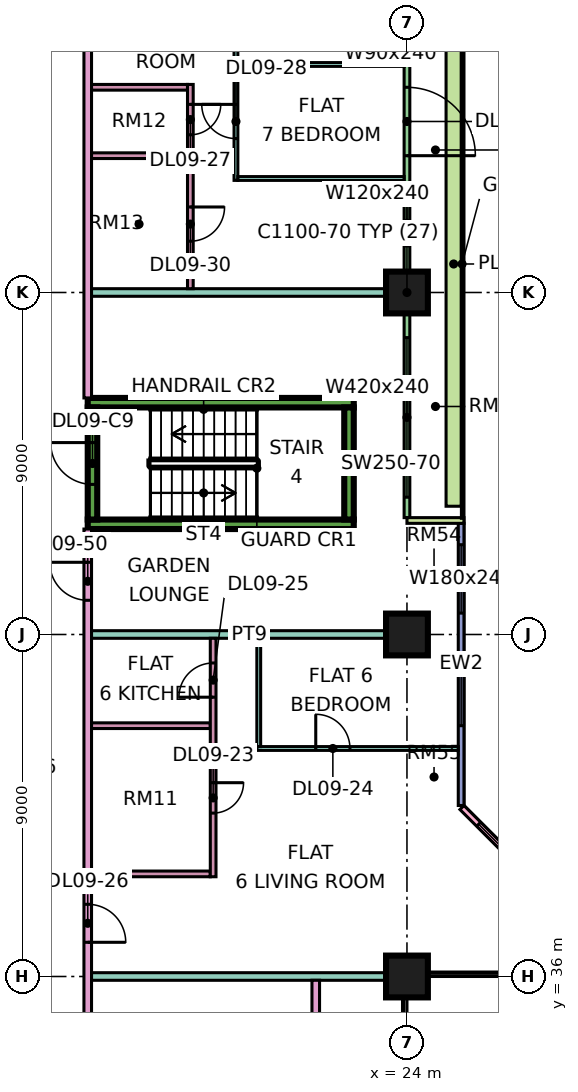
"""IFC4 building model, lengths in metres.
Left out: names, types, materials, properties, quantities, classifications, styles, units other than length and angle.
Written with IfcOpenShell. Run it as: python <this file> out.ifc"""

import sys

from ifc_helpers import new_model, si_unit, direction, frame, frame_2d, origin, origin_2d, place, context, subcontext, project, spatial, rectangle, extrude, element, fill, save


model = new_model("IFC4")
c1 = context("Model", 3, precision=1e-05, world=origin(), true_north=direction((0.0, 1.0)))
c2 = subcontext(c1, "Body", "Model", "MODEL_VIEW")
j1 = project(units=[si_unit("LENGTHUNIT", "METRE"), si_unit("PLANEANGLEUNIT", "RADIAN")], contexts=[c1])
p1 = place(None, origin())
s1 = spatial("IfcSite", under=j1, at=p1, CompositionType="ELEMENT")
p2 = place(p1, origin())
s2 = spatial("IfcBuilding", under=s1, at=p2, CompositionType="ELEMENT")
p3 = place(p2, frame((0.0, 0.0, 48.9)))
s3 = spatial("IfcBuildingStorey", under=s2, at=p3, CompositionType="ELEMENT", Elevation=48.9)
for number, where, z_axis, x_axis in (
    (1, (24.0, 36.0, 0.0), (0.0, 0.0, 1.0), (1.0, 0.0, 0.0)),
    (2, (24.0, 45.0, 0.0), (0.0, 0.0, 1.0), (1.0, 0.0, 0.0)),
    (3, (24.0, 54.0, 0.0), (0.0, 0.0, 1.0), (1.0, 0.0, 0.0)),
):
    element("IfcColumn", number, at=place(p3, frame(where, z_axis=z_axis, x_axis=x_axis)), inside=s3, PredefinedType="COLUMN", context=c2, shape_type="SweptSolid", body=[
        extrude(rectangle(XDim=1.1, YDim=1.1, at=origin_2d()), origin(), (0.0, 0.0, 1.0), 3.75),
    ])
for number, where, z_axis, x_axis in (
    (4, (15.6, 47.9, 0.0), (0.0, 0.0, 1.0), (1.0, 0.0, 0.0)),
    (5, (15.6, 51.1, 0.0), (0.0, 0.0, 1.0), (1.0, 0.0, 0.0)),
):
    element("IfcWall", number, at=place(p3, frame(where, z_axis=z_axis, x_axis=x_axis)), inside=s3, PredefinedType="SHEAR", context=c2, shape_type="SweptSolid", body=[
        extrude(rectangle(XDim=7.0, YDim=0.25, at=frame_2d((3.5, 0.0))), origin(), (0.0, 0.0, 1.0), 3.75),
    ])
p4 = place(p3, frame((15.725, 48.025, 0.0), z_axis=(0.0, 0.0, 1.0), x_axis=(0.0, 1.0, 0.0)))
e6 = element("IfcWall", 6, at=p4, inside=s3, PredefinedType="SHEAR", context=c2, shape_type="SweptSolid", body=[
    extrude(rectangle(XDim=2.95, YDim=0.25, at=frame_2d((1.475, 0.0))), origin(), (0.0, 0.0, 1.0), 3.75),
])
p5 = place(p4, frame((0.925, 0.0, 0.0)))
e7 = element("IfcOpeningElement", 7, at=p5, cuts=e6, PredefinedType="OPENING", context=c2, shape_type="SweptSolid", body=[
    extrude(rectangle(XDim=1.1, YDim=2.2, at=frame_2d((0.55, 1.1))), frame((0.0, 0.135, 0.0), z_axis=(0.0, -1.0, 0.0), x_axis=(1.0, 0.0, 0.0)), (0.0, 0.0, 1.0), 0.27),
])
p6 = place(p3, frame((22.475, 48.025, 0.0), z_axis=(0.0, 0.0, 1.0), x_axis=(0.0, 1.0, 0.0)))
e8 = element("IfcWall", 8, at=p6, inside=s3, PredefinedType="SHEAR", context=c2, shape_type="SweptSolid", body=[
    extrude(rectangle(XDim=2.95, YDim=0.25, at=frame_2d((1.475, 0.0))), origin(), (0.0, 0.0, 1.0), 3.75),
])
p7 = place(p3, frame((28.447, 37.447, 0.0), z_axis=(0.0, 0.0, 1.0), x_axis=(-0.707106781187, 0.707106781187, 0.0)))
e9 = element("IfcWall", 9, at=p7, inside=s3, PredefinedType="SOLIDWALL", context=c2, shape_type="SweptSolid", body=[
    extrude(rectangle(XDim=4.243, YDim=0.15, at=frame_2d((2.121, 0.0))), origin(), (0.0, 0.0, 1.0), 3.35),
])
p8 = place(p7, frame((0.621, 0.0, 0.45)))
e10 = element("IfcOpeningElement", 10, at=p8, cuts=e9, PredefinedType="OPENING", context=c2, shape_type="SweptSolid", body=[
    extrude(rectangle(XDim=3.0, YDim=2.4, at=frame_2d((1.5, 1.2))), frame((0.0, 0.085, 0.0), z_axis=(0.0, -1.0, 0.0), x_axis=(1.0, 0.0, 0.0)), (0.0, 0.0, 1.0), 0.17),
])
p9 = place(p3, frame((25.425, 40.5, 0.0), z_axis=(0.0, 0.0, 1.0), x_axis=(0.0, 1.0, 0.0)))
e11 = element("IfcWall", 11, at=p9, inside=s3, PredefinedType="SOLIDWALL", context=c2, shape_type="SweptSolid", body=[
    extrude(rectangle(XDim=7.425, YDim=0.15, at=frame_2d((3.712, 0.0))), origin(), (0.0, 0.0, 1.0), 3.35),
])
p10 = place(p9, frame((2.1, 0.0, 0.45)))
e12 = element("IfcOpeningElement", 12, at=p10, cuts=e11, PredefinedType="OPENING", context=c2, shape_type="SweptSolid", body=[
    extrude(rectangle(XDim=1.8, YDim=2.4, at=frame_2d((0.9, 1.2))), frame((0.0, 0.085, 0.0), z_axis=(0.0, -1.0, 0.0), x_axis=(1.0, 0.0, 0.0)), (0.0, 0.0, 1.0), 0.17),
])
p11 = place(p9, frame((5.062, 0.0, 0.45)))
e13 = element("IfcOpeningElement", 13, at=p11, cuts=e11, PredefinedType="OPENING", context=c2, shape_type="SweptSolid", body=[
    extrude(rectangle(XDim=1.8, YDim=2.4, at=frame_2d((0.9, 1.2))), frame((0.0, 0.085, 0.0), z_axis=(0.0, -1.0, 0.0), x_axis=(1.0, 0.0, 0.0)), (0.0, 0.0, 1.0), 0.17),
])
p12 = place(p3, frame((24.0, 48.075, 0.0), z_axis=(0.0, 0.0, 1.0), x_axis=(0.0, 1.0, 0.0)))
e14 = element("IfcWall", 14, at=p12, inside=s3, PredefinedType="SOLIDWALL", context=c2, shape_type="SweptSolid", body=[
    extrude(rectangle(XDim=13.35, YDim=0.15, at=frame_2d((6.675, 0.0))), origin(), (0.0, 0.0, 1.0), 3.35),
])
p13 = place(p12, frame((0.538, 0.0, 0.45)))
e15 = element("IfcOpeningElement", 15, at=p13, cuts=e14, PredefinedType="OPENING", context=c2, shape_type="SweptSolid", body=[
    extrude(rectangle(XDim=4.2, YDim=2.4, at=frame_2d((2.1, 1.2))), frame((0.0, 0.085, 0.0), z_axis=(0.0, -1.0, 0.0), x_axis=(1.0, 0.0, 0.0)), (0.0, 0.0, 1.0), 0.17),
])
p14 = place(p12, frame((7.15, 0.0, 0.45)))
e16 = element("IfcOpeningElement", 16, at=p14, cuts=e14, PredefinedType="OPENING", context=c2, shape_type="SweptSolid", body=[
    extrude(rectangle(XDim=1.2, YDim=2.4, at=frame_2d((0.6, 1.2))), frame((0.0, 0.085, 0.0), z_axis=(0.0, -1.0, 0.0), x_axis=(1.0, 0.0, 0.0)), (0.0, 0.0, 1.0), 0.17),
])
p15 = place(p12, frame((9.525, 0.0, 0.0)))
e17 = element("IfcOpeningElement", 17, at=p15, cuts=e14, PredefinedType="OPENING", context=c2, shape_type="SweptSolid", body=[
    extrude(rectangle(XDim=1.8, YDim=2.4, at=frame_2d((0.9, 1.2))), frame((0.0, 0.085, 0.0), z_axis=(0.0, -1.0, 0.0), x_axis=(1.0, 0.0, 0.0)), (0.0, 0.0, 1.0), 0.17),
])
p16 = place(p12, frame((12.188, 0.0, 0.45)))
e18 = element("IfcOpeningElement", 18, at=p16, cuts=e14, PredefinedType="OPENING", context=c2, shape_type="SweptSolid", body=[
    extrude(rectangle(XDim=0.9, YDim=2.4, at=frame_2d((0.45, 1.2))), frame((0.0, 0.085, 0.0), z_axis=(0.0, -1.0, 0.0), x_axis=(1.0, 0.0, 0.0)), (0.0, 0.0, 1.0), 0.17),
])
p17 = place(p3, frame((25.5, 48.0, 0.0), z_axis=(0.0, 0.0, 1.0), x_axis=(-1.0, 0.0, 0.0)))
e19 = element("IfcWall", 19, at=p17, inside=s3, PredefinedType="SOLIDWALL", context=c2, shape_type="SweptSolid", body=[
    extrude(rectangle(XDim=1.5, YDim=0.15, at=frame_2d((0.75, 0.0))), origin(), (0.0, 0.0, 1.0), 3.35),
])
p18 = place(p3, frame((25.229, 48.375, 0.0), z_axis=(0.0, 0.0, 1.0), x_axis=(0.0, 1.0, 0.0)))
e20 = element("IfcWall", 20, at=p18, inside=s3, PredefinedType="SOLIDWALL", context=c2, shape_type="SweptSolid", body=[
    extrude(rectangle(XDim=12.75, YDim=0.4, at=frame_2d((6.375, 0.0))), origin(), (0.0, 0.0, 1.0), 0.7),
])
p19 = place(p3, frame((15.6, 20.0, 0.0), z_axis=(0.0, 0.0, 1.0), x_axis=(0.0, 1.0, 0.0)))
e21 = element("IfcWall", 21, at=p19, inside=s3, PredefinedType="PARTITIONING", context=c2, shape_type="SweptSolid", body=[
    extrude(rectangle(XDim=27.775, YDim=0.2, at=frame_2d((13.887, 0.0))), origin(), (0.0, 0.0, 1.0), 3.35),
])
p20 = place(p19, frame((6.7, 0.0, 0.0)))
e22 = element("IfcOpeningElement", 22, at=p20, cuts=e21, PredefinedType="OPENING", context=c2, shape_type="SweptSolid", body=[
    extrude(rectangle(XDim=1.6, YDim=2.1, at=frame_2d((0.8, 1.05))), frame((0.0, 0.11, 0.0), z_axis=(0.0, -1.0, 0.0), x_axis=(1.0, 0.0, 0.0)), (0.0, 0.0, 1.0), 0.22),
])
p21 = place(p19, frame((12.95, 0.0, 0.0)))
e23 = element("IfcOpeningElement", 23, at=p21, cuts=e21, PredefinedType="OPENING", context=c2, shape_type="SweptSolid", body=[
    extrude(rectangle(XDim=1.0, YDim=2.1, at=frame_2d((0.5, 1.05))), frame((0.0, 0.11, 0.0), z_axis=(0.0, -1.0, 0.0), x_axis=(1.0, 0.0, 0.0)), (0.0, 0.0, 1.0), 0.22),
])
p22 = place(p19, frame((16.9, 0.0, 0.0)))
e24 = element("IfcOpeningElement", 24, at=p22, cuts=e21, PredefinedType="OPENING", context=c2, shape_type="SweptSolid", body=[
    extrude(rectangle(XDim=1.0, YDim=2.1, at=frame_2d((0.5, 1.05))), frame((0.0, 0.11, 0.0), z_axis=(0.0, -1.0, 0.0), x_axis=(1.0, 0.0, 0.0)), (0.0, 0.0, 1.0), 0.22),
])
p23 = place(p19, frame((1.15, 0.0, 0.0)))
e25 = element("IfcOpeningElement", 25, at=p23, cuts=e21, PredefinedType="OPENING", context=c2, shape_type="SweptSolid", body=[
    extrude(rectangle(XDim=1.8, YDim=2.1, at=frame_2d((0.9, 1.05))), frame((0.0, 0.11, 0.0), z_axis=(0.0, -1.0, 0.0), x_axis=(1.0, 0.0, 0.0)), (0.0, 0.0, 1.0), 0.22),
])
p24 = place(p19, frame((25.9, 0.0, 0.0)))
e26 = element("IfcOpeningElement", 26, at=p24, cuts=e21, PredefinedType="OPENING", context=c2, shape_type="SweptSolid", body=[
    extrude(rectangle(XDim=1.0, YDim=2.1, at=frame_2d((0.5, 1.05))), frame((0.0, 0.11, 0.0), z_axis=(0.0, -1.0, 0.0), x_axis=(1.0, 0.0, 0.0)), (0.0, 0.0, 1.0), 0.22),
])
p25 = place(p3, frame((15.6, 51.225, 0.0), z_axis=(0.0, 0.0, 1.0), x_axis=(0.0, 1.0, 0.0)))
e27 = element("IfcWall", 27, at=p25, inside=s3, PredefinedType="PARTITIONING", context=c2, shape_type="SweptSolid", body=[
    extrude(rectangle(XDim=13.125, YDim=0.2, at=frame_2d((6.562, 0.0))), origin(), (0.0, 0.0, 1.0), 3.35),
])
p26 = place(p25, frame((9.525, 0.0, 0.0)))
e28 = element("IfcOpeningElement", 28, at=p26, cuts=e27, PredefinedType="OPENING", context=c2, shape_type="SweptSolid", body=[
    extrude(rectangle(XDim=1.0, YDim=2.1, at=frame_2d((0.5, 1.05))), frame((0.0, 0.11, 0.0), z_axis=(0.0, -1.0, 0.0), x_axis=(1.0, 0.0, 0.0)), (0.0, 0.0, 1.0), 0.22),
])
p27 = place(p3, frame((15.7, 36.0, 0.0), z_axis=(0.0, 0.0, 1.0), x_axis=(1.0, 0.0, 0.0)))
e29 = element("IfcWall", 29, at=p27, inside=s3, PredefinedType="PARTITIONING", context=c2, shape_type="SweptSolid", body=[
    extrude(rectangle(XDim=8.3, YDim=0.2, at=frame_2d((4.15, 0.0))), origin(), (0.0, 0.0, 1.0), 3.35),
])
for number, where, z_axis, x_axis in (
    (30, (15.7, 38.7, 0.0), (0.0, 0.0, 1.0), (1.0, 0.0, 0.0)),
    (31, (15.7, 42.6, 0.0), (0.0, 0.0, 1.0), (1.0, 0.0, 0.0)),
):
    element("IfcWall", number, at=place(p3, frame(where, z_axis=z_axis, x_axis=x_axis)), inside=s3, PredefinedType="PARTITIONING", context=c2, shape_type="SweptSolid", body=[
        extrude(rectangle(XDim=3.125, YDim=0.15, at=frame_2d((1.562, 0.0))), origin(), (0.0, 0.0, 1.0), 3.35),
    ])
p28 = place(p3, frame((15.7, 45.0, 0.0), z_axis=(0.0, 0.0, 1.0), x_axis=(1.0, 0.0, 0.0)))
e32 = element("IfcWall", 32, at=p28, inside=s3, PredefinedType="PARTITIONING", context=c2, shape_type="SweptSolid", body=[
    extrude(rectangle(XDim=8.3, YDim=0.2, at=frame_2d((4.15, 0.0))), origin(), (0.0, 0.0, 1.0), 3.35),
])
p29 = place(p3, frame((15.7, 54.0, 0.0), z_axis=(0.0, 0.0, 1.0), x_axis=(1.0, 0.0, 0.0)))
e33 = element("IfcWall", 33, at=p29, inside=s3, PredefinedType="PARTITIONING", context=c2, shape_type="SweptSolid", body=[
    extrude(rectangle(XDim=8.226, YDim=0.2, at=frame_2d((4.113, 0.0))), origin(), (0.0, 0.0, 1.0), 3.35),
])
for number, where, z_axis, x_axis in (
    (34, (15.7, 57.6, 0.0), (0.0, 0.0, 1.0), (1.0, 0.0, 0.0)),
    (35, (15.7, 59.4, 0.0), (0.0, 0.0, 1.0), (1.0, 0.0, 0.0)),
):
    element("IfcWall", number, at=place(p3, frame(where, z_axis=z_axis, x_axis=x_axis)), inside=s3, PredefinedType="PARTITIONING", context=c2, shape_type="SweptSolid", body=[
        extrude(rectangle(XDim=2.525, YDim=0.15, at=frame_2d((1.263, 0.0))), origin(), (0.0, 0.0, 1.0), 3.35),
    ])
p30 = place(p3, frame((18.3, 54.1, 0.0), z_axis=(0.0, 0.0, 1.0), x_axis=(0.0, 1.0, 0.0)))
e36 = element("IfcWall", 36, at=p30, inside=s3, PredefinedType="PARTITIONING", context=c2, shape_type="SweptSolid", body=[
    extrude(rectangle(XDim=5.375, YDim=0.15, at=frame_2d((2.688, 0.0))), origin(), (0.0, 0.0, 1.0), 3.35),
])
p31 = place(p30, frame((4.05, 0.0, 0.0)))
e37 = element("IfcOpeningElement", 37, at=p31, cuts=e36, PredefinedType="OPENING", context=c2, shape_type="SweptSolid", body=[
    extrude(rectangle(XDim=0.8, YDim=2.1, at=frame_2d((0.4, 1.05))), frame((0.0, 0.085, 0.0), z_axis=(0.0, -1.0, 0.0), x_axis=(1.0, 0.0, 0.0)), (0.0, 0.0, 1.0), 0.17),
])
p32 = place(p30, frame((1.25, 0.0, 0.0)))
e38 = element("IfcOpeningElement", 38, at=p32, cuts=e36, PredefinedType="OPENING", context=c2, shape_type="SweptSolid", body=[
    extrude(rectangle(XDim=0.9, YDim=2.1, at=frame_2d((0.45, 1.05))), frame((0.0, 0.085, 0.0), z_axis=(0.0, -1.0, 0.0), x_axis=(1.0, 0.0, 0.0)), (0.0, 0.0, 1.0), 0.17),
])
p33 = place(p3, frame((18.9, 38.625, 0.0), z_axis=(0.0, 0.0, 1.0), x_axis=(0.0, 1.0, 0.0)))
e39 = element("IfcWall", 39, at=p33, inside=s3, PredefinedType="PARTITIONING", context=c2, shape_type="SweptSolid", body=[
    extrude(rectangle(XDim=6.275, YDim=0.15, at=frame_2d((3.137, 0.0))), origin(), (0.0, 0.0, 1.0), 3.35),
])
p34 = place(p33, frame((1.675, 0.0, 0.0)))
e40 = element("IfcOpeningElement", 40, at=p34, cuts=e39, PredefinedType="OPENING", context=c2, shape_type="SweptSolid", body=[
    extrude(rectangle(XDim=0.8, YDim=2.1, at=frame_2d((0.4, 1.05))), frame((0.0, 0.085, 0.0), z_axis=(0.0, -1.0, 0.0), x_axis=(1.0, 0.0, 0.0)), (0.0, 0.0, 1.0), 0.17),
])
p35 = place(p33, frame((4.725, 0.0, 0.0)))
e41 = element("IfcOpeningElement", 41, at=p35, cuts=e39, PredefinedType="OPENING", context=c2, shape_type="SweptSolid", body=[
    extrude(rectangle(XDim=0.9, YDim=2.1, at=frame_2d((0.45, 1.05))), frame((0.0, 0.085, 0.0), z_axis=(0.0, -1.0, 0.0), x_axis=(1.0, 0.0, 0.0)), (0.0, 0.0, 1.0), 0.17),
])
p36 = place(p3, frame((19.5, 56.95, 0.0), z_axis=(0.0, 0.0, 1.0), x_axis=(0.0, 1.0, 0.0)))
e42 = element("IfcWall", 42, at=p36, inside=s3, PredefinedType="PARTITIONING", context=c2, shape_type="SweptSolid", body=[
    extrude(rectangle(XDim=7.4, YDim=0.1, at=frame_2d((3.7, 0.0))), origin(), (0.0, 0.0, 1.0), 3.35),
])
p37 = place(p36, frame((1.1, 0.0, 0.0)))
e43 = element("IfcOpeningElement", 43, at=p37, cuts=e42, PredefinedType="OPENING", context=c2, shape_type="SweptSolid", body=[
    extrude(rectangle(XDim=0.9, YDim=2.1, at=frame_2d((0.45, 1.05))), frame((0.0, 0.06, 0.0), z_axis=(0.0, -1.0, 0.0), x_axis=(1.0, 0.0, 0.0)), (0.0, 0.0, 1.0), 0.12),
])
p38 = place(p36, frame((4.1, 0.0, 0.0)))
e44 = element("IfcOpeningElement", 44, at=p38, cuts=e42, PredefinedType="OPENING", context=c2, shape_type="SweptSolid", body=[
    extrude(rectangle(XDim=0.9, YDim=2.1, at=frame_2d((0.45, 1.05))), frame((0.0, 0.06, 0.0), z_axis=(0.0, -1.0, 0.0), x_axis=(1.0, 0.0, 0.0)), (0.0, 0.0, 1.0), 0.12),
])
for number, where, z_axis, x_axis in (
    (45, (19.55, 57.0, 0.0), (0.0, 0.0, 1.0), (1.0, 0.0, 0.0)),
    (46, (19.55, 60.0, 0.0), (0.0, 0.0, 1.0), (1.0, 0.0, 0.0)),
):
    element("IfcWall", number, at=place(p3, frame(where, z_axis=z_axis, x_axis=x_axis)), inside=s3, PredefinedType="PARTITIONING", context=c2, shape_type="SweptSolid", body=[
        extrude(rectangle(XDim=4.376, YDim=0.1, at=frame_2d((2.188, 0.0))), origin(), (0.0, 0.0, 1.0), 3.35),
    ])
p39 = place(p3, frame((20.05, 42.0, 0.0), z_axis=(0.0, 0.0, 1.0), x_axis=(1.0, 0.0, 0.0)))
e47 = element("IfcWall", 47, at=p39, inside=s3, PredefinedType="PARTITIONING", context=c2, shape_type="SweptSolid", body=[
    extrude(rectangle(XDim=5.3, YDim=0.1, at=frame_2d((2.65, 0.0))), origin(), (0.0, 0.0, 1.0), 3.35),
])
p40 = place(p39, frame((1.55, 0.0, 0.0)))
e48 = element("IfcOpeningElement", 48, at=p40, cuts=e47, PredefinedType="OPENING", context=c2, shape_type="SweptSolid", body=[
    extrude(rectangle(XDim=0.9, YDim=2.1, at=frame_2d((0.45, 1.05))), frame((0.0, 0.06, 0.0), z_axis=(0.0, -1.0, 0.0), x_axis=(1.0, 0.0, 0.0)), (0.0, 0.0, 1.0), 0.12),
])
p41 = place(p3, frame((20.1, 42.05, 0.0), z_axis=(0.0, 0.0, 1.0), x_axis=(0.0, 1.0, 0.0)))
e49 = element("IfcWall", 49, at=p41, inside=s3, PredefinedType="PARTITIONING", context=c2, shape_type="SweptSolid", body=[
    extrude(rectangle(XDim=2.85, YDim=0.1, at=frame_2d((1.425, 0.0))), origin(), (0.0, 0.0, 1.0), 3.35),
])
p42 = place(p3, frame((21.6, 23.9, 0.0), z_axis=(0.0, 0.0, 1.0), x_axis=(0.0, 1.0, 0.0)))
e50 = element("IfcWall", 50, at=p42, inside=s3, PredefinedType="PARTITIONING", context=c2, shape_type="SweptSolid", body=[
    extrude(rectangle(XDim=12.0, YDim=0.2, at=frame_2d((6.0, 0.0))), origin(), (0.0, 0.0, 1.0), 3.35),
])
p43 = place(p8, origin())
e51 = element("IfcWindow", 51, at=p43, inside=s3, PartitioningType="SINGLE_PANEL", PredefinedType="WINDOW", context=c2, shape_type="SweptSolid", body=[
    extrude(rectangle(XDim=3.0, YDim=2.4, at=frame_2d((1.5, 1.2))), frame((0.0, 0.03, 0.0), z_axis=(0.0, -1.0, 0.0), x_axis=(1.0, 0.0, 0.0)), (0.0, 0.0, 1.0), 0.06),
])
fill(e10, e51)
p44 = place(p10, origin())
e52 = element("IfcWindow", 52, at=p44, inside=s3, PartitioningType="SINGLE_PANEL", PredefinedType="WINDOW", context=c2, shape_type="SweptSolid", body=[
    extrude(rectangle(XDim=1.8, YDim=2.4, at=frame_2d((0.9, 1.2))), frame((0.0, 0.03, 0.0), z_axis=(0.0, -1.0, 0.0), x_axis=(1.0, 0.0, 0.0)), (0.0, 0.0, 1.0), 0.06),
])
fill(e12, e52)
p45 = place(p11, origin())
e53 = element("IfcWindow", 53, at=p45, inside=s3, PartitioningType="SINGLE_PANEL", PredefinedType="WINDOW", context=c2, shape_type="SweptSolid", body=[
    extrude(rectangle(XDim=1.8, YDim=2.4, at=frame_2d((0.9, 1.2))), frame((0.0, 0.03, 0.0), z_axis=(0.0, -1.0, 0.0), x_axis=(1.0, 0.0, 0.0)), (0.0, 0.0, 1.0), 0.06),
])
fill(e13, e53)
p46 = place(p13, origin())
e54 = element("IfcWindow", 54, at=p46, inside=s3, PartitioningType="SINGLE_PANEL", PredefinedType="WINDOW", context=c2, shape_type="SweptSolid", body=[
    extrude(rectangle(XDim=4.2, YDim=2.4, at=frame_2d((2.1, 1.2))), frame((0.0, 0.03, 0.0), z_axis=(0.0, -1.0, 0.0), x_axis=(1.0, 0.0, 0.0)), (0.0, 0.0, 1.0), 0.06),
])
fill(e15, e54)
p47 = place(p14, origin())
e55 = element("IfcWindow", 55, at=p47, inside=s3, PartitioningType="SINGLE_PANEL", PredefinedType="WINDOW", context=c2, shape_type="SweptSolid", body=[
    extrude(rectangle(XDim=1.2, YDim=2.4, at=frame_2d((0.6, 1.2))), frame((0.0, 0.03, 0.0), z_axis=(0.0, -1.0, 0.0), x_axis=(1.0, 0.0, 0.0)), (0.0, 0.0, 1.0), 0.06),
])
fill(e16, e55)
p48 = place(p15, frame((1.8, 0.0, 0.0), z_axis=(0.0, 0.0, 1.0), x_axis=(-1.0, 0.0, 0.0)))
e56 = element("IfcDoor", 56, at=p48, inside=s3, OperationType="DOUBLE_DOOR_SINGLE_SWING", PredefinedType="DOOR", context=c2, shape_type="SweptSolid", body=[
    extrude(rectangle(XDim=1.8, YDim=2.4, at=frame_2d((0.9, 1.2))), frame((0.0, 0.025, 0.0), z_axis=(0.0, -1.0, 0.0), x_axis=(1.0, 0.0, 0.0)), (0.0, 0.0, 1.0), 0.05),
])
fill(e17, e56)
p49 = place(p16, origin())
e57 = element("IfcWindow", 57, at=p49, inside=s3, PartitioningType="SINGLE_PANEL", PredefinedType="WINDOW", context=c2, shape_type="SweptSolid", body=[
    extrude(rectangle(XDim=0.9, YDim=2.4, at=frame_2d((0.45, 1.2))), frame((0.0, 0.03, 0.0), z_axis=(0.0, -1.0, 0.0), x_axis=(1.0, 0.0, 0.0)), (0.0, 0.0, 1.0), 0.06),
])
fill(e18, e57)
p50 = place(p5, frame((1.1, 0.0, 0.0), z_axis=(0.0, 0.0, 1.0), x_axis=(-1.0, 0.0, 0.0)))
e58 = element("IfcDoor", 58, at=p50, inside=s3, OperationType="SINGLE_SWING_RIGHT", PredefinedType="DOOR", context=c2, shape_type="SweptSolid", body=[
    extrude(rectangle(XDim=1.1, YDim=2.2, at=frame_2d((0.55, 1.1))), frame((0.0, 0.025, 0.0), z_axis=(0.0, -1.0, 0.0), x_axis=(1.0, 0.0, 0.0)), (0.0, 0.0, 1.0), 0.05),
])
fill(e7, e58)
p51 = place(p34, origin())
e59 = element("IfcDoor", 59, at=p51, inside=s3, OperationType="SINGLE_SWING_RIGHT", PredefinedType="DOOR", context=c2, shape_type="SweptSolid", body=[
    extrude(rectangle(XDim=0.8, YDim=2.1, at=frame_2d((0.4, 1.05))), frame((0.0, 0.025, 0.0), z_axis=(0.0, -1.0, 0.0), x_axis=(1.0, 0.0, 0.0)), (0.0, 0.0, 1.0), 0.05),
])
fill(e40, e59)
p52 = place(p40, origin())
e60 = element("IfcDoor", 60, at=p52, inside=s3, OperationType="SINGLE_SWING_LEFT", PredefinedType="DOOR", context=c2, shape_type="SweptSolid", body=[
    extrude(rectangle(XDim=0.9, YDim=2.1, at=frame_2d((0.45, 1.05))), frame((0.0, 0.025, 0.0), z_axis=(0.0, -1.0, 0.0), x_axis=(1.0, 0.0, 0.0)), (0.0, 0.0, 1.0), 0.05),
])
fill(e48, e60)
p53 = place(p35, origin())
e61 = element("IfcDoor", 61, at=p53, inside=s3, OperationType="SINGLE_SWING_LEFT", PredefinedType="DOOR", context=c2, shape_type="SweptSolid", body=[
    extrude(rectangle(XDim=0.9, YDim=2.1, at=frame_2d((0.45, 1.05))), frame((0.0, 0.025, 0.0), z_axis=(0.0, -1.0, 0.0), x_axis=(1.0, 0.0, 0.0)), (0.0, 0.0, 1.0), 0.05),
])
fill(e41, e61)
p54 = place(p22, frame((1.0, 0.0, 0.0), z_axis=(0.0, 0.0, 1.0), x_axis=(-1.0, 0.0, 0.0)))
e62 = element("IfcDoor", 62, at=p54, inside=s3, OperationType="SINGLE_SWING_LEFT", PredefinedType="DOOR", context=c2, shape_type="SweptSolid", body=[
    extrude(rectangle(XDim=1.0, YDim=2.1, at=frame_2d((0.5, 1.05))), frame((0.0, 0.025, 0.0), z_axis=(0.0, -1.0, 0.0), x_axis=(1.0, 0.0, 0.0)), (0.0, 0.0, 1.0), 0.05),
])
fill(e24, e62)
p55 = place(p31, origin())
e63 = element("IfcDoor", 63, at=p55, inside=s3, OperationType="SINGLE_SWING_RIGHT", PredefinedType="DOOR", context=c2, shape_type="SweptSolid", body=[
    extrude(rectangle(XDim=0.8, YDim=2.1, at=frame_2d((0.4, 1.05))), frame((0.0, 0.025, 0.0), z_axis=(0.0, -1.0, 0.0), x_axis=(1.0, 0.0, 0.0)), (0.0, 0.0, 1.0), 0.05),
])
fill(e37, e63)
p56 = place(p37, frame((0.9, 0.0, 0.0), z_axis=(0.0, 0.0, 1.0), x_axis=(-1.0, 0.0, 0.0)))
e64 = element("IfcDoor", 64, at=p56, inside=s3, OperationType="SINGLE_SWING_RIGHT", PredefinedType="DOOR", context=c2, shape_type="SweptSolid", body=[
    extrude(rectangle(XDim=0.9, YDim=2.1, at=frame_2d((0.45, 1.05))), frame((0.0, 0.025, 0.0), z_axis=(0.0, -1.0, 0.0), x_axis=(1.0, 0.0, 0.0)), (0.0, 0.0, 1.0), 0.05),
])
fill(e43, e64)
p57 = place(p32, origin())
e65 = element("IfcDoor", 65, at=p57, inside=s3, OperationType="SINGLE_SWING_RIGHT", PredefinedType="DOOR", context=c2, shape_type="SweptSolid", body=[
    extrude(rectangle(XDim=0.9, YDim=2.1, at=frame_2d((0.45, 1.05))), frame((0.0, 0.025, 0.0), z_axis=(0.0, -1.0, 0.0), x_axis=(1.0, 0.0, 0.0)), (0.0, 0.0, 1.0), 0.05),
])
fill(e38, e65)
p58 = place(p24, frame((1.0, 0.0, 0.0), z_axis=(0.0, 0.0, 1.0), x_axis=(-1.0, 0.0, 0.0)))
e66 = element("IfcDoor", 66, at=p58, inside=s3, OperationType="SINGLE_SWING_RIGHT", PredefinedType="DOOR", context=c2, shape_type="SweptSolid", body=[
    extrude(rectangle(XDim=1.0, YDim=2.1, at=frame_2d((0.5, 1.05))), frame((0.0, 0.025, 0.0), z_axis=(0.0, -1.0, 0.0), x_axis=(1.0, 0.0, 0.0)), (0.0, 0.0, 1.0), 0.05),
])
fill(e26, e66)
save(model, sys.argv[1])
